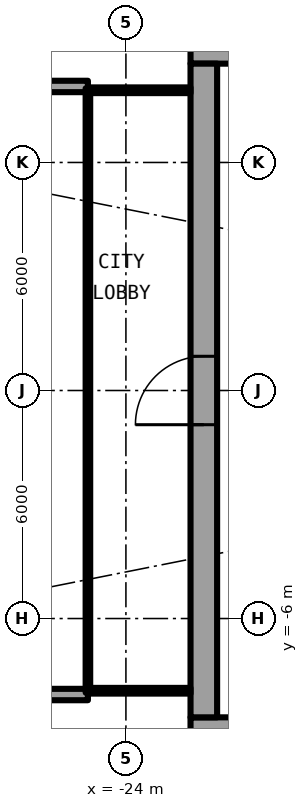
"""IFC4 building model, lengths in metres.
Left out: names, types, materials, properties, quantities, classifications, styles, units other than length and angle.
Written with IfcOpenShell. Run it as: python <this file> out.ifc"""

import sys

from ifc_helpers import new_model, si_unit, direction, frame, frame_2d, origin, place, context, subcontext, project, spatial, rectangle, extrude, element, fill, save


model = new_model("IFC4")
c1 = context("Model", 3, precision=1e-05, world=origin(), true_north=direction((0.0, 1.0)))
c2 = subcontext(c1, "Body", "Model", "MODEL_VIEW")
j1 = project(units=[si_unit("LENGTHUNIT", "METRE"), si_unit("PLANEANGLEUNIT", "RADIAN")], contexts=[c1])
p1 = place(None, origin())
s1 = spatial("IfcSite", under=j1, at=p1, CompositionType="ELEMENT")
p2 = place(p1, origin())
s2 = spatial("IfcBuilding", under=s1, at=p2, CompositionType="ELEMENT")
p3 = place(p2, frame((0.0, 0.0, 69.7)))
s3 = spatial("IfcBuildingStorey", under=s2, at=p3, CompositionType="ELEMENT", Elevation=69.7)
for number, where, z_axis, x_axis in (
    (1, (-25.0, 8.0, 0.0), (0.0, 0.0, 1.0), (-1.0, 0.0, 0.0)),
    (2, (-25.0, -8.0, 0.0), (0.0, 0.0, 1.0), (-1.0, 0.0, 0.0)),
):
    element("IfcWall", number, at=place(p3, frame(where, z_axis=z_axis, x_axis=x_axis)), inside=s3, PredefinedType="SOLIDWALL", context=c2, shape_type="SweptSolid", body=[
        extrude(rectangle(XDim=2.667, YDim=0.3, at=frame_2d((1.333, 0.0))), origin(), (0.0, 0.0, 1.0), 2.7),
    ])
p4 = place(p3, frame((-22.3, -8.95, 0.0), z_axis=(0.0, 0.0, 1.0), x_axis=(1.0, 0.0, 0.0)))
e3 = element("IfcWall", 3, at=p4, inside=s3, PredefinedType="SHEAR", context=c2, shape_type="SweptSolid", body=[
    extrude(rectangle(XDim=14.0, YDim=0.7, at=frame_2d((7.0, 0.0))), origin(), (0.0, 0.0, 1.0), 3.05),
])
p5 = place(p4, frame((1.225, 0.0, 0.0)))
e4 = element("IfcOpeningElement", 4, at=p5, cuts=e3, PredefinedType="OPENING", context=c2, shape_type="SweptSolid", body=[
    extrude(rectangle(XDim=1.2, YDim=2.3, at=frame_2d((0.6, 1.15))), frame((0.0, 0.36, 0.0), z_axis=(0.0, -1.0, 0.0), x_axis=(1.0, 0.0, 0.0)), (0.0, 0.0, 1.0), 0.72),
])
p6 = place(p3, frame((-8.3, 8.95, 0.0), z_axis=(0.0, 0.0, 1.0), x_axis=(-1.0, 0.0, 0.0)))
e5 = element("IfcWall", 5, at=p6, inside=s3, PredefinedType="SHEAR", context=c2, shape_type="SweptSolid", body=[
    extrude(rectangle(XDim=14.0, YDim=0.7, at=frame_2d((7.0, 0.0))), origin(), (0.0, 0.0, 1.0), 3.05),
])
p7 = place(p6, frame((11.575, 0.0, 0.0)))
e6 = element("IfcOpeningElement", 6, at=p7, cuts=e5, PredefinedType="OPENING", context=c2, shape_type="SweptSolid", body=[
    extrude(rectangle(XDim=1.2, YDim=2.3, at=frame_2d((0.6, 1.15))), frame((0.0, 0.36, 0.0), z_axis=(0.0, -1.0, 0.0), x_axis=(1.0, 0.0, 0.0)), (0.0, 0.0, 1.0), 0.72),
])
p8 = place(p3, frame((-21.95, -8.6, 0.0), z_axis=(0.0, 0.0, 1.0), x_axis=(0.0, 1.0, 0.0)))
e7 = element("IfcWall", 7, at=p8, inside=s3, PredefinedType="SHEAR", context=c2, shape_type="SweptSolid", body=[
    extrude(rectangle(XDim=17.2, YDim=0.7, at=frame_2d((8.6, 0.0))), origin(), (0.0, 0.0, 1.0), 3.05),
])
p9 = place(p8, frame((7.7, 0.0, 0.0)))
e8 = element("IfcOpeningElement", 8, at=p9, cuts=e7, PredefinedType="OPENING", context=c2, shape_type="SweptSolid", body=[
    extrude(rectangle(XDim=1.8, YDim=2.3, at=frame_2d((0.9, 1.15))), frame((0.0, 0.36, 0.0), z_axis=(0.0, -1.0, 0.0), x_axis=(1.0, 0.0, 0.0)), (0.0, 0.0, 1.0), 0.72),
])
for number, where, z_axis, x_axis in (
    (9, (-22.3, 7.9, 0.0), (0.0, 0.0, 1.0), (-1.0, 0.0, 0.0)),
    (10, (-22.3, -7.9, 0.0), (0.0, 0.0, 1.0), (-1.0, 0.0, 0.0)),
):
    element("IfcWall", number, at=place(p3, frame(where, z_axis=z_axis, x_axis=x_axis)), inside=s3, PredefinedType="PARTITIONING", context=c2, shape_type="SweptSolid", body=[
        extrude(rectangle(XDim=2.64, YDim=0.15, at=frame_2d((1.32, 0.0))), origin(), (0.0, 0.0, 1.0), 2.7),
    ])
p10 = place(p3, frame((-25.0, 7.95, 0.0), z_axis=(0.0, 0.0, 1.0), x_axis=(0.0, -1.0, 0.0)))
e11 = element("IfcWall", 11, at=p10, inside=s3, PredefinedType="PARTITIONING", context=c2, shape_type="SweptSolid", body=[
    extrude(rectangle(XDim=15.9, YDim=0.12, at=frame_2d((7.95, 0.0))), origin(), (0.0, 0.0, 1.0), 2.7),
])
p11 = place(p10, frame((0.95, 0.0, 0.1)))
e12 = element("IfcOpeningElement", 12, at=p11, cuts=e11, PredefinedType="OPENING", context=c2, shape_type="SweptSolid", body=[
    extrude(rectangle(XDim=14.0, YDim=2.35, at=frame_2d((7.0, 1.175))), frame((0.0, 0.07, 0.0), z_axis=(0.0, -1.0, 0.0), x_axis=(1.0, 0.0, 0.0)), (0.0, 0.0, 1.0), 0.14),
])
p12 = place(p9, origin())
e13 = element("IfcDoor", 13, at=p12, inside=s3, OperationType="SINGLE_SWING_LEFT", PredefinedType="DOOR", context=c2, shape_type="SweptSolid", body=[
    extrude(rectangle(XDim=1.8, YDim=2.3, at=frame_2d((0.9, 1.15))), frame((0.0, 0.025, 0.0), z_axis=(0.0, -1.0, 0.0), x_axis=(1.0, 0.0, 0.0)), (0.0, 0.0, 1.0), 0.05),
])
fill(e8, e13)
p13 = place(p11, origin())
e14 = element("IfcWindow", 14, at=p13, inside=s3, PartitioningType="SINGLE_PANEL", PredefinedType="WINDOW", context=c2, shape_type="SweptSolid", body=[
    extrude(rectangle(XDim=14.0, YDim=2.35, at=frame_2d((7.0, 1.175))), frame((0.0, 0.03, 0.0), z_axis=(0.0, -1.0, 0.0), x_axis=(1.0, 0.0, 0.0)), (0.0, 0.0, 1.0), 0.06),
])
fill(e12, e14)
save(model, sys.argv[1])
